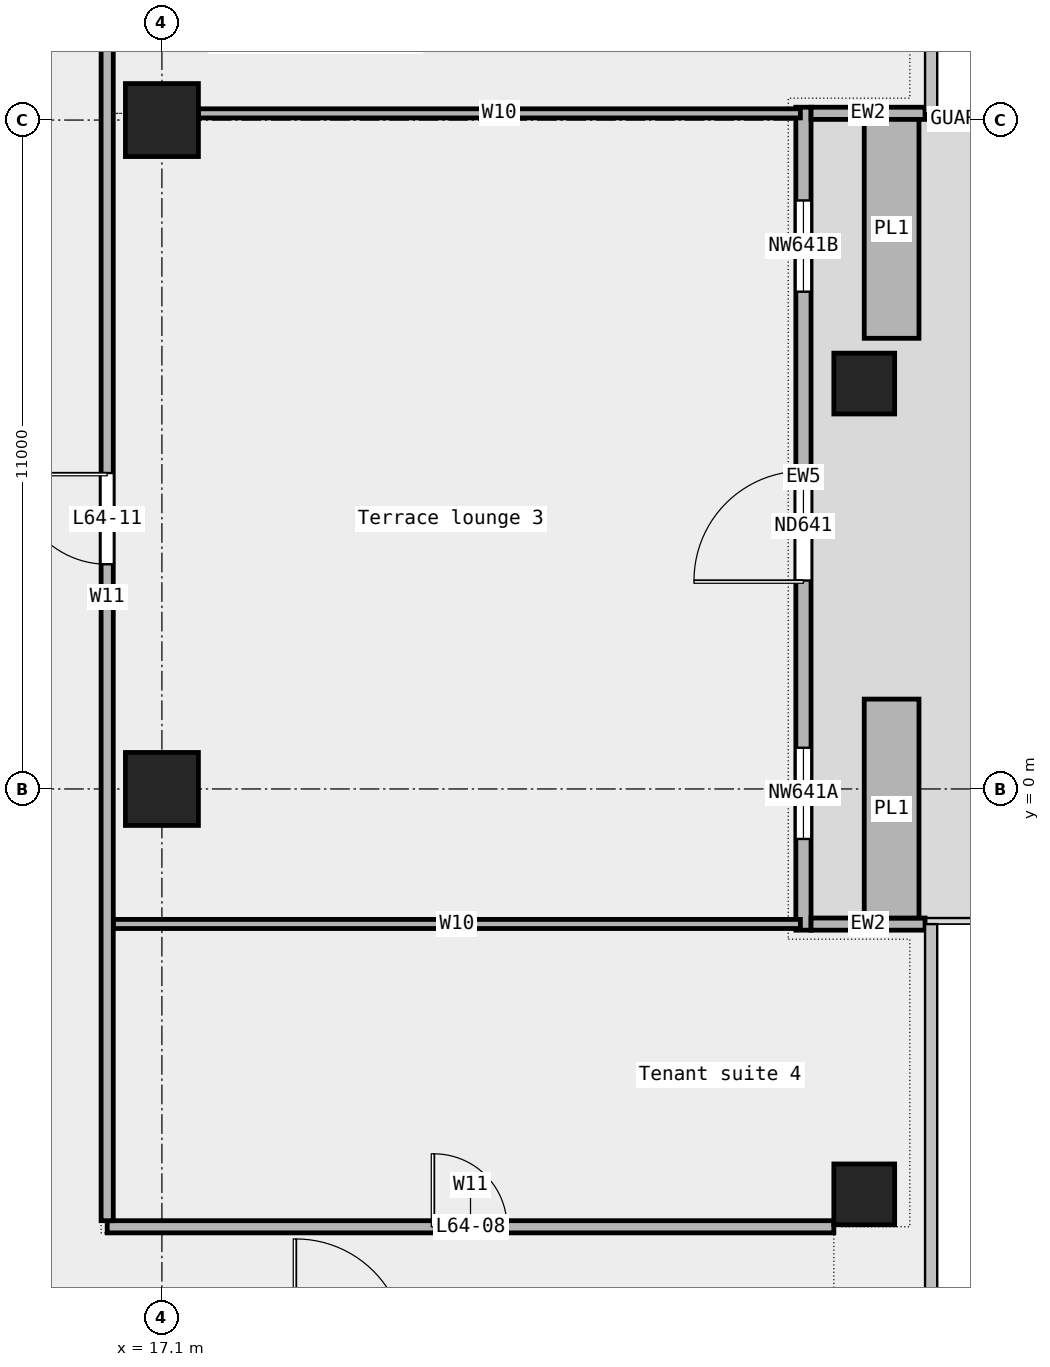
"""IFC4 building model, lengths in metres.
Left out: names, types, materials, properties, quantities, classifications, styles, units other than length and angle.
Written with IfcOpenShell. Run it as: python <this file> out.ifc"""

import sys

from ifc_helpers import new_model, si_unit, direction, frame, frame_2d, origin, origin_2d, place, context, subcontext, project, spatial, rectangle, extrude, element, fill, save


model = new_model("IFC4")
c1 = context("Model", 3, precision=1e-05, world=origin(), true_north=direction((0.0, 1.0)))
c2 = subcontext(c1, "Body", "Model", "MODEL_VIEW")
j1 = project(units=[si_unit("LENGTHUNIT", "METRE"), si_unit("PLANEANGLEUNIT", "RADIAN")], contexts=[c1])
p1 = place(None, origin())
s1 = spatial("IfcSite", under=j1, at=p1, CompositionType="ELEMENT")
p2 = place(p1, origin())
s2 = spatial("IfcBuilding", under=s1, at=p2, CompositionType="ELEMENT")
p3 = place(p2, frame((0.0, 0.0, 295.4)))
s3 = spatial("IfcBuildingStorey", under=s2, at=p3, CompositionType="ELEMENT", Elevation=295.4)
for number, where, z_axis, x_axis in (
    (1, (28.65, -6.667, 0.0), (0.0, 0.0, 1.0), (1.0, 0.0, 0.0)),
    (2, (28.65, 6.667, 0.0), (0.0, 0.0, 1.0), (1.0, 0.0, 0.0)),
):
    element("IfcColumn", number, at=place(p3, frame(where, z_axis=z_axis, x_axis=x_axis)), inside=s3, PredefinedType="COLUMN", context=c2, shape_type="SweptSolid", body=[
        extrude(rectangle(XDim=1.0, YDim=1.0, at=origin_2d()), origin(), (0.0, 0.0, 1.0), 3.6),
    ])
for number, where, z_axis, x_axis in (
    (3, (17.1, 0.0, 0.0), (0.0, 0.0, 1.0), (1.0, 0.0, 0.0)),
    (4, (17.1, 11.0, 0.0), (0.0, 0.0, 1.0), (1.0, 0.0, 0.0)),
):
    element("IfcColumn", number, at=place(p3, frame(where, z_axis=z_axis, x_axis=x_axis)), inside=s3, PredefinedType="COLUMN", context=c2, shape_type="SweptSolid", body=[
        extrude(rectangle(XDim=1.2, YDim=1.2, at=origin_2d()), origin(), (0.0, 0.0, 1.0), 3.6),
    ])
p4 = place(p3, frame((27.65, -2.322, 0.0), z_axis=(0.0, 0.0, 1.0), x_axis=(0.0, 1.0, 0.0)))
e5 = element("IfcWall", 5, at=p4, inside=s3, PredefinedType="STANDARD", context=c2, shape_type="SweptSolid", body=[
    extrude(rectangle(XDim=13.533, YDim=0.25, at=frame_2d((6.767, 0.0))), origin(), (0.0, 0.0, 1.0), 3.6),
])
p5 = place(p4, frame((1.5, 0.0, 0.45)))
e6 = element("IfcOpeningElement", 6, at=p5, cuts=e5, PredefinedType="OPENING", context=c2, shape_type="SweptSolid", body=[
    extrude(rectangle(XDim=1.5, YDim=2.4, at=frame_2d((0.75, 1.2))), frame((0.0, 0.137, 0.0), z_axis=(0.0, -1.0, 0.0), x_axis=(1.0, 0.0, 0.0)), (0.0, 0.0, 1.0), 0.274),
])
p6 = place(p4, frame((5.75, 0.0, 0.0)))
e7 = element("IfcOpeningElement", 7, at=p6, cuts=e5, PredefinedType="OPENING", context=c2, shape_type="SweptSolid", body=[
    extrude(rectangle(XDim=1.8, YDim=2.4, at=frame_2d((0.9, 1.2))), frame((0.0, 0.137, 0.0), z_axis=(0.0, -1.0, 0.0), x_axis=(1.0, 0.0, 0.0)), (0.0, 0.0, 1.0), 0.274),
])
p7 = place(p4, frame((10.5, 0.0, 0.45)))
e8 = element("IfcOpeningElement", 8, at=p7, cuts=e5, PredefinedType="OPENING", context=c2, shape_type="SweptSolid", body=[
    extrude(rectangle(XDim=1.5, YDim=2.4, at=frame_2d((0.75, 1.2))), frame((0.0, 0.137, 0.0), z_axis=(0.0, -1.0, 0.0), x_axis=(1.0, 0.0, 0.0)), (0.0, 0.0, 1.0), 0.274),
])
for number, where, z_axis, x_axis in (
    (9, (29.65, -2.222, 0.0), (0.0, 0.0, 1.0), (-1.0, 0.0, 0.0)),
    (10, (29.65, 11.111, 0.0), (0.0, 0.0, 1.0), (-1.0, 0.0, 0.0)),
):
    element("IfcWall", number, at=place(p3, frame(where, z_axis=z_axis, x_axis=x_axis)), inside=s3, PredefinedType="STANDARD", context=c2, shape_type="SweptSolid", body=[
        extrude(rectangle(XDim=1.875, YDim=0.2, at=frame_2d((0.938, 0.0))), origin(), (0.0, 0.0, 1.0), 3.6),
    ])
for number, where, z_axis, x_axis in (
    (11, (29.1, -2.122, 0.0), (0.0, 0.0, 1.0), (0.0, 1.0, 0.0)),
    (12, (29.1, 7.411, 0.0), (0.0, 0.0, 1.0), (0.0, 1.0, 0.0)),
):
    element("IfcWall", number, at=place(p3, frame(where, z_axis=z_axis, x_axis=x_axis)), inside=s3, PredefinedType="STANDARD", context=c2, shape_type="SweptSolid", body=[
        extrude(rectangle(XDim=3.6, YDim=0.9, at=frame_2d((1.8, 0.0))), origin(), (0.0, 0.0, 1.0), 0.7),
    ])
p8 = place(p3, frame((16.2, -7.2, 0.0), z_axis=(0.0, 0.0, 1.0), x_axis=(1.0, 0.0, 0.0)))
e13 = element("IfcWall", 13, at=p8, inside=s3, PredefinedType="PARTITIONING", context=c2, shape_type="SweptSolid", body=[
    extrude(rectangle(XDim=11.95, YDim=0.2, at=frame_2d((5.975, 0.0))), origin(), (0.0, 0.0, 1.0), 3.6),
])
p9 = place(p8, frame((5.375, 0.0, 0.0)))
e14 = element("IfcOpeningElement", 14, at=p9, cuts=e13, PredefinedType="OPENING", context=c2, shape_type="SweptSolid", body=[
    extrude(rectangle(XDim=1.2, YDim=2.1, at=frame_2d((0.6, 1.05))), frame((0.0, 0.112, 0.0), z_axis=(0.0, -1.0, 0.0), x_axis=(1.0, 0.0, 0.0)), (0.0, 0.0, 1.0), 0.224),
])
p10 = place(p3, frame((16.3, -2.22, 0.0), z_axis=(0.0, 0.0, 1.0), x_axis=(1.0, 0.0, 0.0)))
e15 = element("IfcWall", 15, at=p10, inside=s3, PredefinedType="PARTITIONING", context=c2, shape_type="SweptSolid", body=[
    extrude(rectangle(XDim=11.3, YDim=0.15, at=frame_2d((5.65, 0.0))), origin(), (0.0, 0.0, 1.0), 3.6),
])
p11 = place(p3, frame((17.7, 11.11, 0.0), z_axis=(0.0, 0.0, 1.0), x_axis=(1.0, 0.0, 0.0)))
e16 = element("IfcWall", 16, at=p11, inside=s3, PredefinedType="PARTITIONING", context=c2, shape_type="SweptSolid", body=[
    extrude(rectangle(XDim=9.9, YDim=0.15, at=frame_2d((4.95, 0.0))), origin(), (0.0, 0.0, 1.0), 3.6),
])
p12 = place(p3, frame((16.2, -7.1, 0.0), z_axis=(0.0, 0.0, 1.0), x_axis=(0.0, 1.0, 0.0)))
e17 = element("IfcWall", 17, at=p12, inside=s3, PredefinedType="PARTITIONING", context=c2, shape_type="SweptSolid", body=[
    extrude(rectangle(XDim=20.5, YDim=0.2, at=frame_2d((10.25, 0.0))), origin(), (0.0, 0.0, 1.0), 3.6),
])
p13 = place(p12, frame((10.795, 0.0, 0.0)))
e18 = element("IfcOpeningElement", 18, at=p13, cuts=e17, PredefinedType="OPENING", context=c2, shape_type="SweptSolid", body=[
    extrude(rectangle(XDim=1.5, YDim=2.1, at=frame_2d((0.75, 1.05))), frame((0.0, 0.112, 0.0), z_axis=(0.0, -1.0, 0.0), x_axis=(1.0, 0.0, 0.0)), (0.0, 0.0, 1.0), 0.224),
])
p14 = place(p5, origin())
e19 = element("IfcWindow", 19, at=p14, inside=s3, PartitioningType="SINGLE_PANEL", PredefinedType="WINDOW", context=c2, shape_type="SweptSolid", body=[
    extrude(rectangle(XDim=1.5, YDim=2.4, at=frame_2d((0.75, 1.2))), frame((0.0, 0.03, 0.0), z_axis=(0.0, -1.0, 0.0), x_axis=(1.0, 0.0, 0.0)), (0.0, 0.0, 1.0), 0.06),
])
fill(e6, e19)
p15 = place(p6, origin())
e20 = element("IfcDoor", 20, at=p15, inside=s3, OperationType="DOUBLE_DOOR_SINGLE_SWING", PredefinedType="DOOR", context=c2, shape_type="SweptSolid", body=[
    extrude(rectangle(XDim=1.8, YDim=2.4, at=frame_2d((0.9, 1.2))), frame((0.0, 0.025, 0.0), z_axis=(0.0, -1.0, 0.0), x_axis=(1.0, 0.0, 0.0)), (0.0, 0.0, 1.0), 0.05),
])
fill(e7, e20)
p16 = place(p7, origin())
e21 = element("IfcWindow", 21, at=p16, inside=s3, PartitioningType="SINGLE_PANEL", PredefinedType="WINDOW", context=c2, shape_type="SweptSolid", body=[
    extrude(rectangle(XDim=1.5, YDim=2.4, at=frame_2d((0.75, 1.2))), frame((0.0, 0.03, 0.0), z_axis=(0.0, -1.0, 0.0), x_axis=(1.0, 0.0, 0.0)), (0.0, 0.0, 1.0), 0.06),
])
fill(e8, e21)
p17 = place(p9, origin())
e22 = element("IfcDoor", 22, at=p17, inside=s3, OperationType="SINGLE_SWING_LEFT", PredefinedType="DOOR", context=c2, shape_type="SweptSolid", body=[
    extrude(rectangle(XDim=1.2, YDim=2.1, at=frame_2d((0.6, 1.05))), frame((0.0, 0.025, 0.0), z_axis=(0.0, -1.0, 0.0), x_axis=(1.0, 0.0, 0.0)), (0.0, 0.0, 1.0), 0.05),
])
fill(e14, e22)
p18 = place(p13, origin())
e23 = element("IfcDoor", 23, at=p18, inside=s3, OperationType="DOUBLE_DOOR_SINGLE_SWING", PredefinedType="DOOR", context=c2, shape_type="SweptSolid", body=[
    extrude(rectangle(XDim=1.5, YDim=2.1, at=frame_2d((0.75, 1.05))), frame((0.0, 0.025, 0.0), z_axis=(0.0, -1.0, 0.0), x_axis=(1.0, 0.0, 0.0)), (0.0, 0.0, 1.0), 0.05),
])
fill(e18, e23)
save(model, sys.argv[1])
